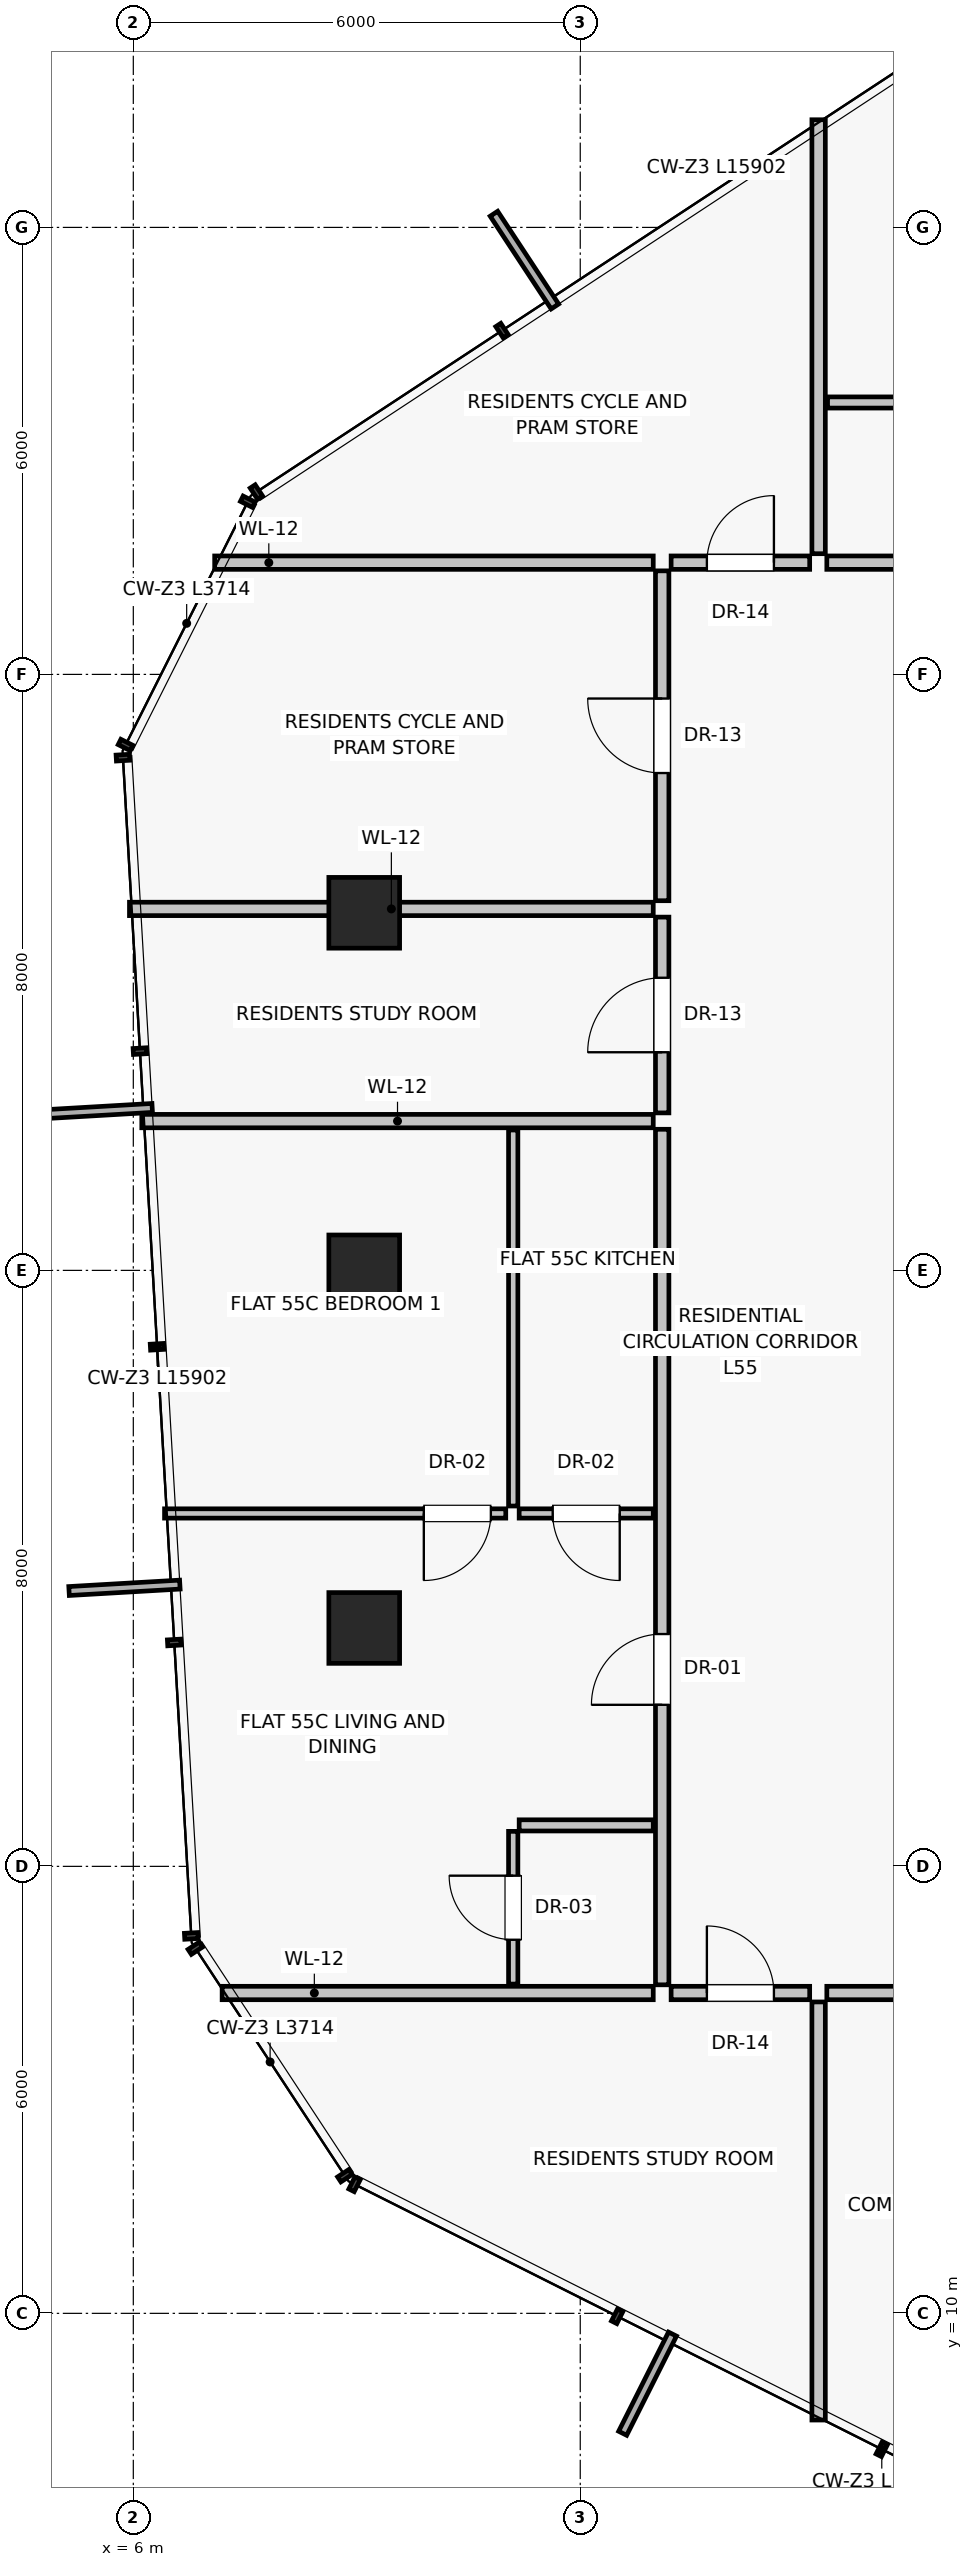
"""IFC4 building model, lengths in metres.
Left out: names, types, materials, properties, quantities, classifications, styles, units other than length and angle.
Written with IfcOpenShell. Run it as: python <this file> out.ifc"""

import sys

from ifc_helpers import new_model, si_unit, direction, frame, frame_2d, origin, origin_2d, place, context, subcontext, project, spatial, rectangle, extrude, source, transform, mapped, element, fill, save


model = new_model("IFC4")
c1 = context("Model", 3, precision=1e-05, world=origin(), true_north=direction((0.0, 1.0)))
c2 = subcontext(c1, "Body", "Model", "MODEL_VIEW")
j1 = project(units=[si_unit("LENGTHUNIT", "METRE"), si_unit("PLANEANGLEUNIT", "RADIAN")], contexts=[c1])
p1 = place(None, origin())
s1 = spatial("IfcSite", under=j1, at=p1, CompositionType="ELEMENT")
p2 = place(p1, origin())
s2 = spatial("IfcBuilding", under=s1, at=p2, CompositionType="ELEMENT")
p3 = place(p2, frame((0.0, 0.0, 195.1)))
s3 = spatial("IfcBuildingStorey", under=s2, at=p3, CompositionType="ELEMENT", Elevation=195.1)
for number, where, z_axis, x_axis in (
    (1, (9.1, 28.8, 0.0), (0.0, 0.0, 1.0), (1.0, 0.0, 0.0)),
    (2, (9.1, 24.0, 0.0), (0.0, 0.0, 1.0), (1.0, 0.0, 0.0)),
    (3, (9.1, 19.2, 0.0), (0.0, 0.0, 1.0), (1.0, 0.0, 0.0)),
):
    element("IfcColumn", number, at=place(p3, frame(where, z_axis=z_axis, x_axis=x_axis)), inside=s3, PredefinedType="COLUMN", context=c2, shape_type="SweptSolid", body=[
        extrude(rectangle(XDim=0.95, YDim=0.95, at=origin_2d()), origin(), (0.0, 0.0, 1.0), 3.25),
    ])
p4 = place(p3, frame((15.2, 14.18, 0.0), z_axis=(0.0, 0.0, 1.0), x_axis=(0.0, -1.0, 0.0)))
e4 = element("IfcWall", 4, at=p4, inside=s3, PredefinedType="PARTITIONING", context=c2, shape_type="SweptSolid", body=[
    extrude(rectangle(XDim=5.612, YDim=0.18, at=frame_2d((2.806, 0.0))), origin(), (0.0, 0.0, 1.0), 3.015),
])
p5 = place(p3, frame((15.31, 14.3, 0.0), z_axis=(0.0, 0.0, 1.0), x_axis=(1.0, 0.0, 0.0)))
e5 = element("IfcWall", 5, at=p5, inside=s3, PredefinedType="PARTITIONING", context=c2, shape_type="SweptSolid", body=[
    extrude(rectangle(XDim=3.056, YDim=0.18, at=frame_2d((1.528, 0.0))), origin(), (0.0, 0.0, 1.0), 3.015),
])
p6 = place(p5, frame((1.028, 0.0, 0.0)))
e6 = element("IfcOpeningElement", 6, at=p6, cuts=e5, PredefinedType="OPENING", context=c2, shape_type="SweptSolid", body=[
    extrude(rectangle(XDim=1.0, YDim=2.01, at=frame_2d((0.5, 1.005))), frame((0.0, 0.1, 0.0), z_axis=(0.0, -1.0, 0.0), x_axis=(1.0, 0.0, 0.0)), (0.0, 0.0, 1.0), 0.2),
])
p7 = place(p3, frame((15.2, 33.62, 0.0), z_axis=(0.0, 0.0, 1.0), x_axis=(0.0, 1.0, 0.0)))
e7 = element("IfcWall", 7, at=p7, inside=s3, PredefinedType="PARTITIONING", context=c2, shape_type="SweptSolid", body=[
    extrude(rectangle(XDim=5.825, YDim=0.18, at=frame_2d((2.913, 0.0))), origin(), (0.0, 0.0, 1.0), 3.015),
])
p8 = place(p3, frame((15.31, 33.5, 0.0), z_axis=(0.0, 0.0, 1.0), x_axis=(1.0, 0.0, 0.0)))
e8 = element("IfcWall", 8, at=p8, inside=s3, PredefinedType="PARTITIONING", context=c2, shape_type="SweptSolid", body=[
    extrude(rectangle(XDim=5.45, YDim=0.18, at=frame_2d((2.725, 0.0))), origin(), (0.0, 0.0, 1.0), 3.015),
])
p9 = place(p8, frame((3.234, 0.0, 0.0)))
e9 = element("IfcOpeningElement", 9, at=p9, cuts=e8, PredefinedType="OPENING", context=c2, shape_type="SweptSolid", body=[
    extrude(rectangle(XDim=0.95, YDim=2.02, at=frame_2d((0.475, 1.01))), frame((0.0, 0.1, 0.0), z_axis=(0.0, -1.0, 0.0), x_axis=(1.0, 0.0, 0.0)), (0.0, 0.0, 1.0), 0.2),
])
p10 = place(p3, frame((15.32, 35.65, 0.0), z_axis=(0.0, 0.0, 1.0), x_axis=(1.0, 0.0, 0.0)))
e10 = element("IfcWall", 10, at=p10, inside=s3, PredefinedType="PARTITIONING", context=c2, shape_type="SweptSolid", body=[
    extrude(rectangle(XDim=2.15, YDim=0.15, at=frame_2d((1.075, 0.0))), origin(), (0.0, 0.0, 1.0), 3.015),
])
p11 = place(p3, frame((12.98, 14.3, 0.0), z_axis=(0.0, 0.0, 1.0), x_axis=(-1.0, 0.0, 0.0)))
e11 = element("IfcWall", 11, at=p11, inside=s3, PredefinedType="PARTITIONING", context=c2, shape_type="SweptSolid", body=[
    extrude(rectangle(XDim=5.788, YDim=0.18, at=frame_2d((2.894, 0.0))), origin(), (0.0, 0.0, 1.0), 3.015),
])
p12 = place(p3, frame((12.98, 33.5, 0.0), z_axis=(0.0, 0.0, 1.0), x_axis=(-1.0, 0.0, 0.0)))
e12 = element("IfcWall", 12, at=p12, inside=s3, PredefinedType="PARTITIONING", context=c2, shape_type="SweptSolid", body=[
    extrude(rectangle(XDim=5.888, YDim=0.18, at=frame_2d((2.944, 0.0))), origin(), (0.0, 0.0, 1.0), 3.015),
])
p13 = place(p3, frame((13.1, 14.41, 0.0), z_axis=(0.0, 0.0, 1.0), x_axis=(0.0, 1.0, 0.0)))
e13 = element("IfcWall", 13, at=p13, inside=s3, PredefinedType="PARTITIONING", context=c2, shape_type="SweptSolid", body=[
    extrude(rectangle(XDim=11.484, YDim=0.18, at=frame_2d((5.742, 0.0))), origin(), (0.0, 0.0, 1.0), 2.662),
])
p14 = place(p13, frame((3.759, 0.0, 0.0)))
e14 = element("IfcOpeningElement", 14, at=p14, cuts=e13, PredefinedType="OPENING", context=c2, shape_type="SweptSolid", body=[
    extrude(rectangle(XDim=0.95, YDim=2.02, at=frame_2d((0.475, 1.01))), frame((0.0, 0.1, 0.0), z_axis=(0.0, -1.0, 0.0), x_axis=(1.0, 0.0, 0.0)), (0.0, 0.0, 1.0), 0.2),
])
p15 = place(p3, frame((12.98, 16.55, 0.0), z_axis=(0.0, 0.0, 1.0), x_axis=(-1.0, 0.0, 0.0)))
e15 = element("IfcWall", 15, at=p15, inside=s3, PredefinedType="PARTITIONING", context=c2, shape_type="SweptSolid", body=[
    extrude(rectangle(XDim=1.8, YDim=0.15, at=frame_2d((0.9, 0.0))), origin(), (0.0, 0.0, 1.0), 3.015),
])
p16 = place(p3, frame((11.1, 14.42, 0.0), z_axis=(0.0, 0.0, 1.0), x_axis=(0.0, 1.0, 0.0)))
e16 = element("IfcWall", 16, at=p16, inside=s3, PredefinedType="PARTITIONING", context=c2, shape_type="SweptSolid", body=[
    extrude(rectangle(XDim=2.05, YDim=0.125, at=frame_2d((1.025, 0.0))), origin(), (0.0, 0.0, 1.0), 3.015),
])
p17 = place(p16, frame((0.595, 0.0, 0.0)))
e17 = element("IfcOpeningElement", 17, at=p17, cuts=e16, PredefinedType="OPENING", context=c2, shape_type="SweptSolid", body=[
    extrude(rectangle(XDim=0.86, YDim=2.01, at=frame_2d((0.43, 1.005))), frame((0.0, 0.073, 0.0), z_axis=(0.0, -1.0, 0.0), x_axis=(1.0, 0.0, 0.0)), (0.0, 0.0, 1.0), 0.145),
])
p18 = place(p3, frame((12.98, 20.737, 0.0), z_axis=(0.0, 0.0, 1.0), x_axis=(-1.0, 0.0, 0.0)))
e18 = element("IfcWall", 18, at=p18, inside=s3, PredefinedType="PARTITIONING", context=c2, shape_type="SweptSolid", body=[
    extrude(rectangle(XDim=1.8, YDim=0.125, at=frame_2d((0.9, 0.0))), origin(), (0.0, 0.0, 1.0), 3.015),
])
p19 = place(p18, frame((0.45, 0.0, 0.0)))
e19 = element("IfcOpeningElement", 19, at=p19, cuts=e18, PredefinedType="OPENING", context=c2, shape_type="SweptSolid", body=[
    extrude(rectangle(XDim=0.9, YDim=2.01, at=frame_2d((0.45, 1.005))), frame((0.0, 0.073, 0.0), z_axis=(0.0, -1.0, 0.0), x_axis=(1.0, 0.0, 0.0)), (0.0, 0.0, 1.0), 0.145),
])
p20 = place(p3, frame((11.1, 20.837, 0.0), z_axis=(0.0, 0.0, 1.0), x_axis=(0.0, 1.0, 0.0)))
e20 = element("IfcWall", 20, at=p20, inside=s3, PredefinedType="PARTITIONING", context=c2, shape_type="SweptSolid", body=[
    extrude(rectangle(XDim=5.047, YDim=0.125, at=frame_2d((2.523, 0.0))), origin(), (0.0, 0.0, 1.0), 3.015),
])
p21 = place(p3, frame((11.0, 20.737, 0.0), z_axis=(0.0, 0.0, 1.0), x_axis=(-1.0, 0.0, 0.0)))
e21 = element("IfcWall", 21, at=p21, inside=s3, PredefinedType="PARTITIONING", context=c2, shape_type="SweptSolid", body=[
    extrude(rectangle(XDim=4.581, YDim=0.125, at=frame_2d((2.291, 0.0))), origin(), (0.0, 0.0, 1.0), 3.015),
])
p22 = place(p21, frame((0.2, 0.0, 0.0)))
e22 = element("IfcOpeningElement", 22, at=p22, cuts=e21, PredefinedType="OPENING", context=c2, shape_type="SweptSolid", body=[
    extrude(rectangle(XDim=0.9, YDim=2.01, at=frame_2d((0.45, 1.005))), frame((0.0, 0.073, 0.0), z_axis=(0.0, -1.0, 0.0), x_axis=(1.0, 0.0, 0.0)), (0.0, 0.0, 1.0), 0.145),
])
p23 = place(p3, frame((12.98, 26.004, 0.0), z_axis=(0.0, 0.0, 1.0), x_axis=(-1.0, 0.0, 0.0)))
e23 = element("IfcWall", 23, at=p23, inside=s3, PredefinedType="PARTITIONING", context=c2, shape_type="SweptSolid", body=[
    extrude(rectangle(XDim=6.866, YDim=0.18, at=frame_2d((3.433, 0.0))), origin(), (0.0, 0.0, 1.0), 3.015),
])
p24 = place(p3, frame((13.1, 26.114, 0.0), z_axis=(0.0, 0.0, 1.0), x_axis=(0.0, 1.0, 0.0)))
e24 = element("IfcWall", 24, at=p24, inside=s3, PredefinedType="PARTITIONING", context=c2, shape_type="SweptSolid", body=[
    extrude(rectangle(XDim=2.628, YDim=0.18, at=frame_2d((1.314, 0.0))), origin(), (0.0, 0.0, 1.0), 2.662),
])
p25 = place(p24, frame((0.814, 0.0, 0.0)))
e25 = element("IfcOpeningElement", 25, at=p25, cuts=e24, PredefinedType="OPENING", context=c2, shape_type="SweptSolid", body=[
    extrude(rectangle(XDim=1.0, YDim=2.01, at=frame_2d((0.5, 1.005))), frame((0.0, 0.1, 0.0), z_axis=(0.0, -1.0, 0.0), x_axis=(1.0, 0.0, 0.0)), (0.0, 0.0, 1.0), 0.2),
])
p26 = place(p3, frame((13.1, 28.962, 0.0), z_axis=(0.0, 0.0, 1.0), x_axis=(0.0, 1.0, 0.0)))
e26 = element("IfcWall", 26, at=p26, inside=s3, PredefinedType="PARTITIONING", context=c2, shape_type="SweptSolid", body=[
    extrude(rectangle(XDim=4.428, YDim=0.18, at=frame_2d((2.214, 0.0))), origin(), (0.0, 0.0, 1.0), 2.662),
])
p27 = place(p26, frame((1.714, 0.0, 0.0)))
e27 = element("IfcOpeningElement", 27, at=p27, cuts=e26, PredefinedType="OPENING", context=c2, shape_type="SweptSolid", body=[
    extrude(rectangle(XDim=1.0, YDim=2.01, at=frame_2d((0.5, 1.005))), frame((0.0, 0.1, 0.0), z_axis=(0.0, -1.0, 0.0), x_axis=(1.0, 0.0, 0.0)), (0.0, 0.0, 1.0), 0.2),
])
p28 = place(p3, frame((12.98, 28.852, 0.0), z_axis=(0.0, 0.0, 1.0), x_axis=(-1.0, 0.0, 0.0)))
e28 = element("IfcWall", 28, at=p28, inside=s3, PredefinedType="PARTITIONING", context=c2, shape_type="SweptSolid", body=[
    extrude(rectangle(XDim=7.031, YDim=0.18, at=frame_2d((3.516, 0.0))), origin(), (0.0, 0.0, 1.0), 2.469),
])
p29 = place(p3, frame((13.22, 14.3, 0.0), z_axis=(0.0, 0.0, 1.0), x_axis=(1.0, 0.0, 0.0)))
e29 = element("IfcWall", 29, at=p29, inside=s3, PredefinedType="PARTITIONING", context=c2, shape_type="SweptSolid", body=[
    extrude(rectangle(XDim=1.86, YDim=0.18, at=frame_2d((0.93, 0.0))), origin(), (0.0, 0.0, 1.0), 3.015),
])
p30 = place(p29, frame((0.48, 0.0, 0.0)))
e30 = element("IfcOpeningElement", 30, at=p30, cuts=e29, PredefinedType="OPENING", context=c2, shape_type="SweptSolid", body=[
    extrude(rectangle(XDim=0.9, YDim=2.01, at=frame_2d((0.45, 1.005))), frame((0.0, 0.1, 0.0), z_axis=(0.0, -1.0, 0.0), x_axis=(1.0, 0.0, 0.0)), (0.0, 0.0, 1.0), 0.2),
])
p31 = place(p3, frame((13.22, 33.5, 0.0), z_axis=(0.0, 0.0, 1.0), x_axis=(1.0, 0.0, 0.0)))
e31 = element("IfcWall", 31, at=p31, inside=s3, PredefinedType="PARTITIONING", context=c2, shape_type="SweptSolid", body=[
    extrude(rectangle(XDim=1.86, YDim=0.18, at=frame_2d((0.93, 0.0))), origin(), (0.0, 0.0, 1.0), 3.015),
])
p32 = place(p31, frame((0.48, 0.0, 0.0)))
e32 = element("IfcOpeningElement", 32, at=p32, cuts=e31, PredefinedType="OPENING", context=c2, shape_type="SweptSolid", body=[
    extrude(rectangle(XDim=0.9, YDim=2.01, at=frame_2d((0.45, 1.005))), frame((0.0, 0.1, 0.0), z_axis=(0.0, -1.0, 0.0), x_axis=(1.0, 0.0, 0.0)), (0.0, 0.0, 1.0), 0.2),
])
m1 = source(origin(), c2, "Body", "SweptSolid", [
    extrude(rectangle(XDim=0.95, YDim=2.02, at=frame_2d((0.475, 1.01))), frame((0.0, 0.025, 0.0), z_axis=(0.0, -1.0, 0.0), x_axis=(1.0, 0.0, 0.0)), (0.0, 0.0, 1.0), 0.05),
])
p33 = place(p14, origin())
e33 = element("IfcDoor", 33, at=p33, inside=s3, OperationType="SINGLE_SWING_LEFT", PredefinedType="DOOR", context=c2, shape_type="MappedRepresentation", body=[
    mapped(m1, transform((0.0, 0.0, 0.0), scale=1.0)),
])
fill(e14, e33)
m2 = source(origin(), c2, "Body", "SweptSolid", [
    extrude(rectangle(XDim=0.86, YDim=2.01, at=frame_2d((0.43, 1.005))), frame((0.0, 0.025, 0.0), z_axis=(0.0, -1.0, 0.0), x_axis=(1.0, 0.0, 0.0)), (0.0, 0.0, 1.0), 0.05),
])
p34 = place(p17, origin())
e34 = element("IfcDoor", 34, at=p34, inside=s3, OperationType="SINGLE_SWING_RIGHT", PredefinedType="DOOR", context=c2, shape_type="MappedRepresentation", body=[
    mapped(m2, transform((0.0, 0.0, 0.0), scale=1.0)),
])
fill(e17, e34)
m3 = source(origin(), c2, "Body", "SweptSolid", [
    extrude(rectangle(XDim=0.9, YDim=2.01, at=frame_2d((0.45, 1.005))), frame((0.0, 0.025, 0.0), z_axis=(0.0, -1.0, 0.0), x_axis=(1.0, 0.0, 0.0)), (0.0, 0.0, 1.0), 0.05),
])
p35 = place(p19, origin())
e35 = element("IfcDoor", 35, at=p35, inside=s3, OperationType="SINGLE_SWING_LEFT", PredefinedType="DOOR", context=c2, shape_type="MappedRepresentation", body=[
    mapped(m3, transform((0.0, 0.0, 0.0), scale=1.0)),
])
fill(e19, e35)
p36 = place(p22, origin())
e36 = element("IfcDoor", 36, at=p36, inside=s3, OperationType="SINGLE_SWING_RIGHT", PredefinedType="DOOR", context=c2, shape_type="MappedRepresentation", body=[
    mapped(m3, transform((0.0, 0.0, 0.0), scale=1.0)),
])
fill(e22, e36)
m4 = source(origin(), c2, "Body", "SweptSolid", [
    extrude(rectangle(XDim=1.0, YDim=2.01, at=frame_2d((0.5, 1.005))), frame((0.0, 0.025, 0.0), z_axis=(0.0, -1.0, 0.0), x_axis=(1.0, 0.0, 0.0)), (0.0, 0.0, 1.0), 0.05),
])
p37 = place(p25, origin())
e37 = element("IfcDoor", 37, at=p37, inside=s3, OperationType="SINGLE_SWING_LEFT", PredefinedType="DOOR", context=c2, shape_type="MappedRepresentation", body=[
    mapped(m4, transform((0.0, 0.0, 0.0), scale=1.0)),
])
fill(e25, e37)
p38 = place(p27, origin())
e38 = element("IfcDoor", 38, at=p38, inside=s3, OperationType="SINGLE_SWING_RIGHT", PredefinedType="DOOR", context=c2, shape_type="MappedRepresentation", body=[
    mapped(m4, transform((0.0, 0.0, 0.0), scale=1.0)),
])
fill(e27, e38)
p39 = place(p30, origin())
e39 = element("IfcDoor", 39, at=p39, inside=s3, OperationType="SINGLE_SWING_LEFT", PredefinedType="DOOR", context=c2, shape_type="MappedRepresentation", body=[
    mapped(m3, transform((0.0, 0.0, 0.0), scale=1.0)),
])
fill(e30, e39)
p40 = place(p32, origin())
e40 = element("IfcDoor", 40, at=p40, inside=s3, OperationType="SINGLE_SWING_RIGHT", PredefinedType="DOOR", context=c2, shape_type="MappedRepresentation", body=[
    mapped(m3, transform((0.0, 0.0, 0.0), scale=1.0)),
])
fill(e32, e40)
save(model, sys.argv[1])
